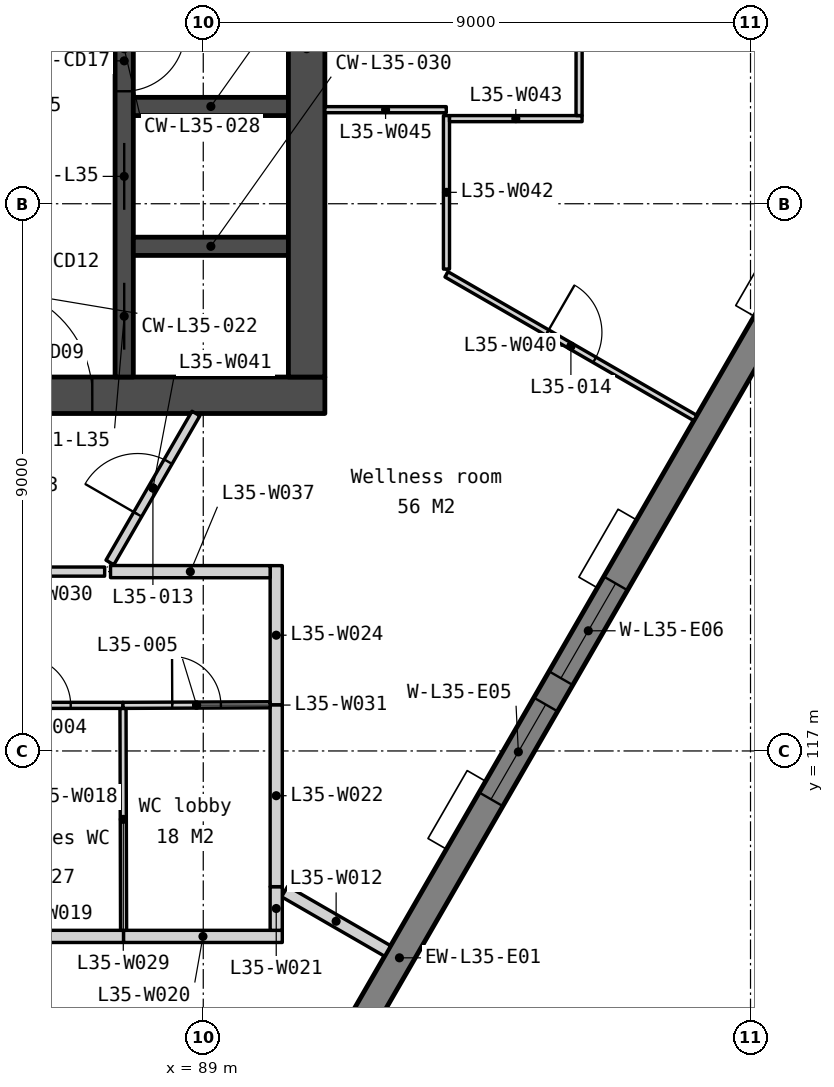
"""IFC4 building model, lengths in metres.
Left out: names, types, materials, properties, quantities, classifications, styles, units other than length and angle.
Written with IfcOpenShell. Run it as: python <this file> out.ifc"""

import sys

from ifc_helpers import new_model, si_unit, direction, frame, frame_2d, origin, place, context, subcontext, project, spatial, polyline, rectangle, outline, extrude, element, fill, save


model = new_model("IFC4")
c1 = context("Model", 3, precision=1e-05, world=origin(), true_north=direction((0.0, 1.0)))
c2 = subcontext(c1, "Body", "Model", "MODEL_VIEW")
j1 = project(units=[si_unit("LENGTHUNIT", "METRE"), si_unit("PLANEANGLEUNIT", "RADIAN")], contexts=[c1])
p1 = place(None, origin())
s1 = spatial("IfcSite", under=j1, at=p1, CompositionType="ELEMENT")
p2 = place(p1, origin())
s2 = spatial("IfcBuilding", under=s1, at=p2, CompositionType="ELEMENT")
p3 = place(p2, frame((0.0, 0.0, 140.3)))
s3 = spatial("IfcBuildingStorey", under=s2, at=p3, CompositionType="ELEMENT", Elevation=140.3)
p4 = place(p3, frame((69.0, 122.85, 0.0), z_axis=(0.0, 0.0, 1.0), x_axis=(1.0, 0.0, 0.0)))
e1 = element("IfcWall", 1, at=p4, inside=s3, PredefinedType="SOLIDWALL", context=c2, shape_type="SweptSolid", body=[
    extrude(rectangle(XDim=22.0, YDim=0.6, at=frame_2d((11.0, 0.0))), origin(), (0.0, 0.0, 1.0), 3.75),
])
p5 = place(p4, frame((16.375, 0.0, 0.0)))
e2 = element("IfcOpeningElement", 2, at=p5, cuts=e1, PredefinedType="OPENING", context=c2, shape_type="SweptSolid", body=[
    extrude(rectangle(XDim=1.8, YDim=2.1, at=frame_2d((0.9, 1.05))), frame((0.0, 0.31, 0.0), z_axis=(0.0, -1.0, 0.0), x_axis=(1.0, 0.0, 0.0)), (0.0, 0.0, 1.0), 0.62),
])
p6 = place(p4, frame((3.825, 0.0, 0.0)))
e3 = element("IfcOpeningElement", 3, at=p6, cuts=e1, PredefinedType="OPENING", context=c2, shape_type="SweptSolid", body=[
    extrude(rectangle(XDim=1.8, YDim=2.1, at=frame_2d((0.9, 1.05))), frame((0.0, 0.31, 0.0), z_axis=(0.0, -1.0, 0.0), x_axis=(1.0, 0.0, 0.0)), (0.0, 0.0, 1.0), 0.62),
])
p7 = place(p4, frame((12.85, 0.0, 0.0)))
e4 = element("IfcOpeningElement", 4, at=p7, cuts=e1, PredefinedType="OPENING", context=c2, shape_type="SweptSolid", body=[
    extrude(rectangle(XDim=1.5, YDim=2.1, at=frame_2d((0.75, 1.05))), frame((0.0, 0.31, 0.0), z_axis=(0.0, -1.0, 0.0), x_axis=(1.0, 0.0, 0.0)), (0.0, 0.0, 1.0), 0.62),
])
p8 = place(p3, frame((87.7, 133.95, 0.0), z_axis=(0.0, 0.0, 1.0), x_axis=(0.0, -1.0, 0.0)))
e5 = element("IfcWall", 5, at=p8, inside=s3, PredefinedType="SOLIDWALL", context=c2, shape_type="SweptSolid", body=[
    extrude(rectangle(XDim=10.8, YDim=0.3, at=frame_2d((5.4, 0.0))), origin(), (0.0, 0.0, 1.0), 3.75),
])
p9 = place(p8, frame((6.95, 0.0, 0.0)))
e6 = element("IfcOpeningElement", 6, at=p9, cuts=e5, PredefinedType="OPENING", context=c2, shape_type="SweptSolid", body=[
    extrude(rectangle(XDim=1.1, YDim=2.1, at=frame_2d((0.55, 1.05))), frame((0.0, 0.16, 0.0), z_axis=(0.0, -1.0, 0.0), x_axis=(1.0, 0.0, 0.0)), (0.0, 0.0, 1.0), 0.32),
])
p10 = place(p8, frame((5.1, 0.0, 0.0)))
e7 = element("IfcOpeningElement", 7, at=p10, cuts=e5, PredefinedType="OPENING", context=c2, shape_type="SweptSolid", body=[
    extrude(rectangle(XDim=1.0, YDim=2.1, at=frame_2d((0.5, 1.05))), frame((0.0, 0.16, 0.0), z_axis=(0.0, -1.0, 0.0), x_axis=(1.0, 0.0, 0.0)), (0.0, 0.0, 1.0), 0.32),
])
p11 = place(p8, frame((9.25, 0.0, 0.0)))
e8 = element("IfcOpeningElement", 8, at=p11, cuts=e5, PredefinedType="OPENING", context=c2, shape_type="SweptSolid", body=[
    extrude(rectangle(XDim=1.1, YDim=2.1, at=frame_2d((0.55, 1.05))), frame((0.0, 0.16, 0.0), z_axis=(0.0, -1.0, 0.0), x_axis=(1.0, 0.0, 0.0)), (0.0, 0.0, 1.0), 0.32),
])
for number, where, z_axis, x_axis in (
    (9, (87.85, 127.6, 0.0), (0.0, 0.0, 1.0), (1.0, 0.0, 0.0)),
    (10, (87.85, 125.3, 0.0), (0.0, 0.0, 1.0), (1.0, 0.0, 0.0)),
):
    element("IfcWall", number, at=place(p3, frame(where, z_axis=z_axis, x_axis=x_axis)), inside=s3, PredefinedType="SOLIDWALL", context=c2, shape_type="SweptSolid", body=[
        extrude(rectangle(XDim=2.55, YDim=0.3, at=frame_2d((1.275, 0.0))), origin(), (0.0, 0.0, 1.0), 3.75),
    ])
p12 = place(p3, frame((90.7, 133.95, 0.0), z_axis=(0.0, 0.0, 1.0), x_axis=(0.0, -1.0, 0.0)))
e11 = element("IfcWall", 11, at=p12, inside=s3, PredefinedType="SOLIDWALL", context=c2, shape_type="SweptSolid", body=[
    extrude(rectangle(XDim=10.8, YDim=0.6, at=frame_2d((5.4, 0.0))), origin(), (0.0, 0.0, 1.0), 3.75),
])
p13 = place(p3, frame((82.105, 96.067, -0.15), z_axis=(0.0, 0.0, 1.0), x_axis=(0.499997369791, 0.866026922331, 0.0)))
e12 = element("IfcWall", 12, at=p13, inside=s3, PredefinedType="SOLIDWALL", context=c2, shape_type="SweptSolid", body=[
    extrude(outline(polyline([(40.486, 0.0), (40.486, 3.9), (0.0, 3.9), (0.0, 0.0), (40.486, 0.0)])), frame((0.0, 0.225, 0.0), z_axis=(0.0, -1.0, 0.0), x_axis=(1.0, 0.0, 0.0)), (0.0, 0.0, 1.0), 0.45),
])
p14 = place(p13, frame((3.011, 0.0, 0.95)))
e13 = element("IfcOpeningElement", 13, at=p14, cuts=e12, PredefinedType="OPENING", context=c2, shape_type="SweptSolid", body=[
    extrude(rectangle(XDim=1.8, YDim=2.2, at=frame_2d((0.9, 1.1))), frame((0.0, 0.235, 0.0), z_axis=(0.0, -1.0, 0.0), x_axis=(1.0, 0.0, 0.0)), (0.0, 0.0, 1.0), 0.47),
])
p15 = place(p13, frame((5.311, 0.0, 0.95)))
e14 = element("IfcOpeningElement", 14, at=p15, cuts=e12, PredefinedType="OPENING", context=c2, shape_type="SweptSolid", body=[
    extrude(rectangle(XDim=1.8, YDim=2.2, at=frame_2d((0.9, 1.1))), frame((0.0, 0.235, 0.0), z_axis=(0.0, -1.0, 0.0), x_axis=(1.0, 0.0, 0.0)), (0.0, 0.0, 1.0), 0.47),
])
p16 = place(p13, frame((13.132, 0.0, 0.95)))
e15 = element("IfcOpeningElement", 15, at=p16, cuts=e12, PredefinedType="OPENING", context=c2, shape_type="SweptSolid", body=[
    extrude(rectangle(XDim=1.8, YDim=2.2, at=frame_2d((0.9, 1.1))), frame((0.0, 0.235, 0.0), z_axis=(0.0, -1.0, 0.0), x_axis=(1.0, 0.0, 0.0)), (0.0, 0.0, 1.0), 0.47),
])
p17 = place(p13, frame((15.432, 0.0, 0.95)))
e16 = element("IfcOpeningElement", 16, at=p17, cuts=e12, PredefinedType="OPENING", context=c2, shape_type="SweptSolid", body=[
    extrude(rectangle(XDim=1.8, YDim=2.2, at=frame_2d((0.9, 1.1))), frame((0.0, 0.235, 0.0), z_axis=(0.0, -1.0, 0.0), x_axis=(1.0, 0.0, 0.0)), (0.0, 0.0, 1.0), 0.47),
])
p18 = place(p13, frame((23.254, 0.0, 0.95)))
e17 = element("IfcOpeningElement", 17, at=p18, cuts=e12, PredefinedType="OPENING", context=c2, shape_type="SweptSolid", body=[
    extrude(rectangle(XDim=1.8, YDim=2.2, at=frame_2d((0.9, 1.1))), frame((0.0, 0.235, 0.0), z_axis=(0.0, -1.0, 0.0), x_axis=(1.0, 0.0, 0.0)), (0.0, 0.0, 1.0), 0.47),
])
p19 = place(p13, frame((25.554, 0.0, 0.95)))
e18 = element("IfcOpeningElement", 18, at=p19, cuts=e12, PredefinedType="OPENING", context=c2, shape_type="SweptSolid", body=[
    extrude(rectangle(XDim=1.8, YDim=2.2, at=frame_2d((0.9, 1.1))), frame((0.0, 0.235, 0.0), z_axis=(0.0, -1.0, 0.0), x_axis=(1.0, 0.0, 0.0)), (0.0, 0.0, 1.0), 0.47),
])
p20 = place(p13, frame((33.375, 0.0, 0.95)))
e19 = element("IfcOpeningElement", 19, at=p20, cuts=e12, PredefinedType="OPENING", context=c2, shape_type="SweptSolid", body=[
    extrude(rectangle(XDim=1.8, YDim=2.2, at=frame_2d((0.9, 1.1))), frame((0.0, 0.235, 0.0), z_axis=(0.0, -1.0, 0.0), x_axis=(1.0, 0.0, 0.0)), (0.0, 0.0, 1.0), 0.47),
])
p21 = place(p13, frame((35.675, 0.0, 0.95)))
e20 = element("IfcOpeningElement", 20, at=p21, cuts=e12, PredefinedType="OPENING", context=c2, shape_type="SweptSolid", body=[
    extrude(rectangle(XDim=1.8, YDim=2.2, at=frame_2d((0.9, 1.1))), frame((0.0, 0.235, 0.0), z_axis=(0.0, -1.0, 0.0), x_axis=(1.0, 0.0, 0.0)), (0.0, 0.0, 1.0), 0.47),
])
p22 = place(p3, frame((83.374, 112.865, 0.0), z_axis=(0.0, 0.0, 1.0), x_axis=(0.866021813296, -0.500006218857, 0.0)))
e21 = element("IfcWall", 21, at=p22, inside=s3, PredefinedType="PARTITIONING", context=c2, shape_type="SweptSolid", body=[
    extrude(rectangle(XDim=7.075, YDim=0.1, at=frame_2d((3.538, 0.0))), origin(), (0.0, 0.0, 1.0), 3.75),
])
p23 = place(p22, frame((3.087, 0.0, 0.0)))
e22 = element("IfcOpeningElement", 22, at=p23, cuts=e21, PredefinedType="OPENING", context=c2, shape_type="SweptSolid", body=[
    extrude(rectangle(XDim=0.9, YDim=2.1, at=frame_2d((0.45, 1.05))), frame((0.0, 0.06, 0.0), z_axis=(0.0, -1.0, 0.0), x_axis=(1.0, 0.0, 0.0)), (0.0, 0.0, 1.0), 0.12),
])
p24 = place(p3, frame((90.339, 114.688, 0.0), z_axis=(0.0, 0.0, 1.0), x_axis=(0.866021300503, -0.500007107024, 0.0)))
e23 = element("IfcWall", 23, at=p24, inside=s3, PredefinedType="PARTITIONING", context=c2, shape_type="SweptSolid", body=[
    extrude(rectangle(XDim=1.955, YDim=0.2, at=frame_2d((0.978, 0.0))), origin(), (0.0, 0.0, 1.0), 3.75),
])
p25 = place(p3, frame((85.15, 113.95, 0.0), z_axis=(0.0, 0.0, 1.0), x_axis=(1.0, 0.0, 0.0)))
e24 = element("IfcWall", 24, at=p25, inside=s3, PredefinedType="PARTITIONING", context=c2, shape_type="SweptSolid", body=[
    extrude(rectangle(XDim=2.54, YDim=0.2, at=frame_2d((1.27, 0.0))), origin(), (0.0, 0.0, 1.0), 3.75),
])
p26 = place(p3, frame((87.69, 113.95, 0.0), z_axis=(0.0, 0.0, 1.0), x_axis=(1.0, 0.0, 0.0)))
e25 = element("IfcWall", 25, at=p26, inside=s3, PredefinedType="PARTITIONING", context=c2, shape_type="SweptSolid", body=[
    extrude(rectangle(XDim=2.61, YDim=0.2, at=frame_2d((1.305, 0.0))), origin(), (0.0, 0.0, 1.0), 3.75),
])
p27 = place(p3, frame((90.2, 114.05, 0.0), z_axis=(0.0, 0.0, 1.0), x_axis=(0.0, 1.0, 0.0)))
e26 = element("IfcWall", 26, at=p27, inside=s3, PredefinedType="PARTITIONING", context=c2, shape_type="SweptSolid", body=[
    extrude(rectangle(XDim=0.718, YDim=0.2, at=frame_2d((0.359, 0.0))), origin(), (0.0, 0.0, 1.0), 3.75),
])
p28 = place(p3, frame((90.2, 114.768, 0.0), z_axis=(0.0, 0.0, 1.0), x_axis=(0.0, 1.0, 0.0)))
e27 = element("IfcWall", 27, at=p28, inside=s3, PredefinedType="PARTITIONING", context=c2, shape_type="SweptSolid", body=[
    extrude(rectangle(XDim=2.992, YDim=0.2, at=frame_2d((1.496, 0.0))), origin(), (0.0, 0.0, 1.0), 3.75),
])
p29 = place(p3, frame((90.2, 117.76, 0.0), z_axis=(0.0, 0.0, 1.0), x_axis=(0.0, 1.0, 0.0)))
e28 = element("IfcWall", 28, at=p29, inside=s3, PredefinedType="PARTITIONING", context=c2, shape_type="SweptSolid", body=[
    extrude(rectangle(XDim=2.288, YDim=0.2, at=frame_2d((1.144, 0.0))), origin(), (0.0, 0.0, 1.0), 3.75),
])
p30 = place(p3, frame((87.69, 114.05, 0.0), z_axis=(0.0, 0.0, 1.0), x_axis=(-0.002608686776, 0.999996597371, 0.0)))
e29 = element("IfcWall", 29, at=p30, inside=s3, PredefinedType="PARTITIONING", context=c2, shape_type="SweptSolid", body=[
    extrude(rectangle(XDim=3.65, YDim=0.1, at=frame_2d((1.825, 0.0))), origin(), (0.0, 0.0, 1.0), 3.75),
])
p31 = place(p3, frame((85.16, 117.75, 0.0), z_axis=(0.0, 0.0, 1.0), x_axis=(1.0, 0.0, 0.0)))
e30 = element("IfcWall", 30, at=p31, inside=s3, PredefinedType="PARTITIONING", context=c2, shape_type="SweptSolid", body=[
    extrude(rectangle(XDim=2.52, YDim=0.1, at=frame_2d((1.26, 0.0))), origin(), (0.0, 0.0, 1.0), 3.75),
])
p32 = place(p31, frame((0.86, 0.0, 0.0)))
e31 = element("IfcOpeningElement", 31, at=p32, cuts=e30, PredefinedType="OPENING", context=c2, shape_type="SweptSolid", body=[
    extrude(rectangle(XDim=0.8, YDim=2.1, at=frame_2d((0.4, 1.05))), frame((0.0, 0.06, 0.0), z_axis=(0.0, -1.0, 0.0), x_axis=(1.0, 0.0, 0.0)), (0.0, 0.0, 1.0), 0.12),
])
p33 = place(p3, frame((87.68, 117.75, 0.0), z_axis=(0.0, 0.0, 1.0), x_axis=(0.999992261016, 0.003934197335, 0.0)))
e32 = element("IfcWall", 32, at=p33, inside=s3, PredefinedType="PARTITIONING", context=c2, shape_type="SweptSolid", body=[
    extrude(rectangle(XDim=2.42, YDim=0.1, at=frame_2d((1.21, 0.0))), origin(), (0.0, 0.0, 1.0), 3.75),
])
p34 = place(p33, frame((0.81, 0.0, 0.0)))
e33 = element("IfcOpeningElement", 33, at=p34, cuts=e32, PredefinedType="OPENING", context=c2, shape_type="SweptSolid", body=[
    extrude(rectangle(XDim=0.8, YDim=2.1, at=frame_2d((0.4, 1.05))), frame((0.0, 0.06, 0.0), z_axis=(0.0, -1.0, 0.0), x_axis=(1.0, 0.0, 0.0)), (0.0, 0.0, 1.0), 0.12),
])
p35 = place(p3, frame((81.2, 119.95, 0.0), z_axis=(0.0, 0.0, 1.0), x_axis=(1.0, 0.0, 0.0)))
e34 = element("IfcWall", 34, at=p35, inside=s3, PredefinedType="PARTITIONING", context=c2, shape_type="SweptSolid", body=[
    extrude(rectangle(XDim=6.178, YDim=0.15, at=frame_2d((3.089, 0.0))), origin(), (0.0, 0.0, 1.0), 3.75),
])
p36 = place(p35, frame((2.589, 0.0, 0.0)))
e35 = element("IfcOpeningElement", 35, at=p36, cuts=e34, PredefinedType="OPENING", context=c2, shape_type="SweptSolid", body=[
    extrude(rectangle(XDim=1.0, YDim=2.1, at=frame_2d((0.5, 1.05))), frame((0.0, 0.085, 0.0), z_axis=(0.0, -1.0, 0.0), x_axis=(1.0, 0.0, 0.0)), (0.0, 0.0, 1.0), 0.17),
])
p37 = place(p3, frame((87.475, 119.95, 0.0), z_axis=(0.0, 0.0, 1.0), x_axis=(0.999999723197, -0.000744047413, 0.0)))
e36 = element("IfcWall", 36, at=p37, inside=s3, PredefinedType="PARTITIONING", context=c2, shape_type="SweptSolid", body=[
    extrude(rectangle(XDim=2.625, YDim=0.2, at=frame_2d((1.312, 0.0))), origin(), (0.0, 0.0, 1.0), 3.75),
])
p38 = place(p3, frame((93.0, 124.839, 0.0), z_axis=(0.0, 0.0, 1.0), x_axis=(0.866028145587, -0.499995251029, 0.0)))
e37 = element("IfcWall", 37, at=p38, inside=s3, PredefinedType="PARTITIONING", context=c2, shape_type="SweptSolid", body=[
    extrude(rectangle(XDim=4.726, YDim=0.1, at=frame_2d((2.363, 0.0))), origin(), (0.0, 0.0, 1.0), 3.75),
])
p39 = place(p38, frame((1.913, 0.0, 0.0)))
e38 = element("IfcOpeningElement", 38, at=p39, cuts=e37, PredefinedType="OPENING", context=c2, shape_type="SweptSolid", body=[
    extrude(rectangle(XDim=0.9, YDim=2.1, at=frame_2d((0.45, 1.05))), frame((0.0, 0.06, 0.0), z_axis=(0.0, -1.0, 0.0), x_axis=(1.0, 0.0, 0.0)), (0.0, 0.0, 1.0), 0.12),
])
p40 = place(p3, frame((87.465, 120.1, 0.0), z_axis=(0.0, 0.0, 1.0), x_axis=(0.499991416419, 0.86603035946, 0.0)))
e39 = element("IfcWall", 39, at=p40, inside=s3, PredefinedType="PARTITIONING", context=c2, shape_type="SweptSolid", body=[
    extrude(rectangle(XDim=2.829, YDim=0.15, at=frame_2d((1.414, 0.0))), origin(), (0.0, 0.0, 1.0), 3.75),
])
p41 = place(p40, frame((0.914, 0.0, 0.0)))
e40 = element("IfcOpeningElement", 40, at=p41, cuts=e39, PredefinedType="OPENING", context=c2, shape_type="SweptSolid", body=[
    extrude(rectangle(XDim=1.0, YDim=2.1, at=frame_2d((0.5, 1.05))), frame((0.0, 0.085, 0.0), z_axis=(0.0, -1.0, 0.0), x_axis=(1.0, 0.0, 0.0)), (0.0, 0.0, 1.0), 0.17),
])
p42 = place(p3, frame((93.0, 124.925, 0.0), z_axis=(0.0, 0.0, 1.0), x_axis=(0.0, 1.0, 0.0)))
e41 = element("IfcWall", 41, at=p42, inside=s3, PredefinedType="PARTITIONING", context=c2, shape_type="SweptSolid", body=[
    extrude(rectangle(XDim=2.525, YDim=0.1, at=frame_2d((1.262, 0.0))), origin(), (0.0, 0.0, 1.0), 3.75),
])
p43 = place(p3, frame((93.05, 127.4, 0.0), z_axis=(0.0, 0.0, 1.0), x_axis=(1.0, 0.0, 0.0)))
e42 = element("IfcWall", 42, at=p43, inside=s3, PredefinedType="PARTITIONING", context=c2, shape_type="SweptSolid", body=[
    extrude(rectangle(XDim=2.18, YDim=0.1, at=frame_2d((1.09, 0.0))), origin(), (0.0, 0.0, 1.0), 3.75),
])
p44 = place(p3, frame((95.18, 127.45, 0.0), z_axis=(0.0, 0.0, 1.0), x_axis=(0.000687710449, 0.999999763527, 0.0)))
e43 = element("IfcWall", 43, at=p44, inside=s3, PredefinedType="PARTITIONING", context=c2, shape_type="SweptSolid", body=[
    extrude(rectangle(XDim=7.1, YDim=0.1, at=frame_2d((3.55, 0.0))), origin(), (0.0, 0.0, 1.0), 3.75),
])
p45 = place(p44, frame((3.1, 0.0, 0.0)))
e44 = element("IfcOpeningElement", 44, at=p45, cuts=e43, PredefinedType="OPENING", context=c2, shape_type="SweptSolid", body=[
    extrude(rectangle(XDim=0.9, YDim=2.1, at=frame_2d((0.45, 1.05))), frame((0.0, 0.06, 0.0), z_axis=(0.0, -1.0, 0.0), x_axis=(1.0, 0.0, 0.0)), (0.0, 0.0, 1.0), 0.12),
])
p46 = place(p3, frame((91.0, 127.547, 0.0), z_axis=(0.0, 0.0, 1.0), x_axis=(1.0, 0.0, 0.0)))
e45 = element("IfcWall", 45, at=p46, inside=s3, PredefinedType="PARTITIONING", context=c2, shape_type="SweptSolid", body=[
    extrude(rectangle(XDim=1.997, YDim=0.1, at=frame_2d((0.999, 0.0))), origin(), (0.0, 0.0, 1.0), 3.75),
])
p47 = place(p9, origin())
e46 = element("IfcDoor", 46, at=p47, inside=s3, OperationType="SLIDING_TO_LEFT", PredefinedType="DOOR", context=c2, shape_type="SweptSolid", body=[
    extrude(rectangle(XDim=1.1, YDim=2.1, at=frame_2d((0.55, 1.05))), frame((0.0, 0.025, 0.0), z_axis=(0.0, -1.0, 0.0), x_axis=(1.0, 0.0, 0.0)), (0.0, 0.0, 1.0), 0.05),
])
fill(e6, e46)
p48 = place(p5, origin())
e47 = element("IfcDoor", 47, at=p48, inside=s3, OperationType="DOUBLE_DOOR_DOUBLE_SWING", PredefinedType="DOOR", context=c2, shape_type="SweptSolid", body=[
    extrude(rectangle(XDim=1.8, YDim=2.1, at=frame_2d((0.9, 1.05))), frame((0.0, 0.025, 0.0), z_axis=(0.0, -1.0, 0.0), x_axis=(1.0, 0.0, 0.0)), (0.0, 0.0, 1.0), 0.05),
])
fill(e2, e47)
p49 = place(p10, origin())
e48 = element("IfcDoor", 48, at=p49, inside=s3, OperationType="SINGLE_SWING_LEFT", PredefinedType="DOOR", context=c2, shape_type="SweptSolid", body=[
    extrude(rectangle(XDim=1.0, YDim=2.1, at=frame_2d((0.5, 1.05))), frame((0.0, 0.025, 0.0), z_axis=(0.0, -1.0, 0.0), x_axis=(1.0, 0.0, 0.0)), (0.0, 0.0, 1.0), 0.05),
])
fill(e7, e48)
p50 = place(p11, origin())
e49 = element("IfcDoor", 49, at=p50, inside=s3, OperationType="SLIDING_TO_LEFT", PredefinedType="DOOR", context=c2, shape_type="SweptSolid", body=[
    extrude(rectangle(XDim=1.1, YDim=2.1, at=frame_2d((0.55, 1.05))), frame((0.0, 0.025, 0.0), z_axis=(0.0, -1.0, 0.0), x_axis=(1.0, 0.0, 0.0)), (0.0, 0.0, 1.0), 0.05),
])
fill(e8, e49)
p51 = place(p18, origin())
e50 = element("IfcWindow", 50, at=p51, inside=s3, PartitioningType="SINGLE_PANEL", PredefinedType="WINDOW", context=c2, shape_type="SweptSolid", body=[
    extrude(rectangle(XDim=1.8, YDim=2.2, at=frame_2d((0.9, 1.1))), frame((0.0, 0.03, 0.0), z_axis=(0.0, -1.0, 0.0), x_axis=(1.0, 0.0, 0.0)), (0.0, 0.0, 1.0), 0.06),
])
fill(e17, e50)
p52 = place(p19, origin())
e51 = element("IfcWindow", 51, at=p52, inside=s3, PartitioningType="SINGLE_PANEL", PredefinedType="WINDOW", context=c2, shape_type="SweptSolid", body=[
    extrude(rectangle(XDim=1.8, YDim=2.2, at=frame_2d((0.9, 1.1))), frame((0.0, 0.03, 0.0), z_axis=(0.0, -1.0, 0.0), x_axis=(1.0, 0.0, 0.0)), (0.0, 0.0, 1.0), 0.06),
])
fill(e18, e51)
p53 = place(p32, origin())
e52 = element("IfcDoor", 52, at=p53, inside=s3, OperationType="SINGLE_SWING_LEFT", PredefinedType="DOOR", context=c2, shape_type="SweptSolid", body=[
    extrude(rectangle(XDim=0.8, YDim=2.1, at=frame_2d((0.4, 1.05))), frame((0.0, 0.025, 0.0), z_axis=(0.0, -1.0, 0.0), x_axis=(1.0, 0.0, 0.0)), (0.0, 0.0, 1.0), 0.05),
])
fill(e31, e52)
p54 = place(p34, origin())
e53 = element("IfcDoor", 53, at=p54, inside=s3, OperationType="SINGLE_SWING_LEFT", PredefinedType="DOOR", context=c2, shape_type="SweptSolid", body=[
    extrude(rectangle(XDim=0.8, YDim=2.1, at=frame_2d((0.4, 1.05))), frame((0.0, 0.025, 0.0), z_axis=(0.0, -1.0, 0.0), x_axis=(1.0, 0.0, 0.0)), (0.0, 0.0, 1.0), 0.05),
])
fill(e33, e53)
p55 = place(p41, origin())
e54 = element("IfcDoor", 54, at=p55, inside=s3, OperationType="SINGLE_SWING_LEFT", PredefinedType="DOOR", context=c2, shape_type="SweptSolid", body=[
    extrude(rectangle(XDim=1.0, YDim=2.1, at=frame_2d((0.5, 1.05))), frame((0.0, 0.025, 0.0), z_axis=(0.0, -1.0, 0.0), x_axis=(1.0, 0.0, 0.0)), (0.0, 0.0, 1.0), 0.05),
])
fill(e40, e54)
p56 = place(p39, origin())
e55 = element("IfcDoor", 55, at=p56, inside=s3, OperationType="SINGLE_SWING_LEFT", PredefinedType="DOOR", context=c2, shape_type="SweptSolid", body=[
    extrude(rectangle(XDim=0.9, YDim=2.1, at=frame_2d((0.45, 1.05))), frame((0.0, 0.025, 0.0), z_axis=(0.0, -1.0, 0.0), x_axis=(1.0, 0.0, 0.0)), (0.0, 0.0, 1.0), 0.05),
])
fill(e38, e55)
save(model, sys.argv[1])
